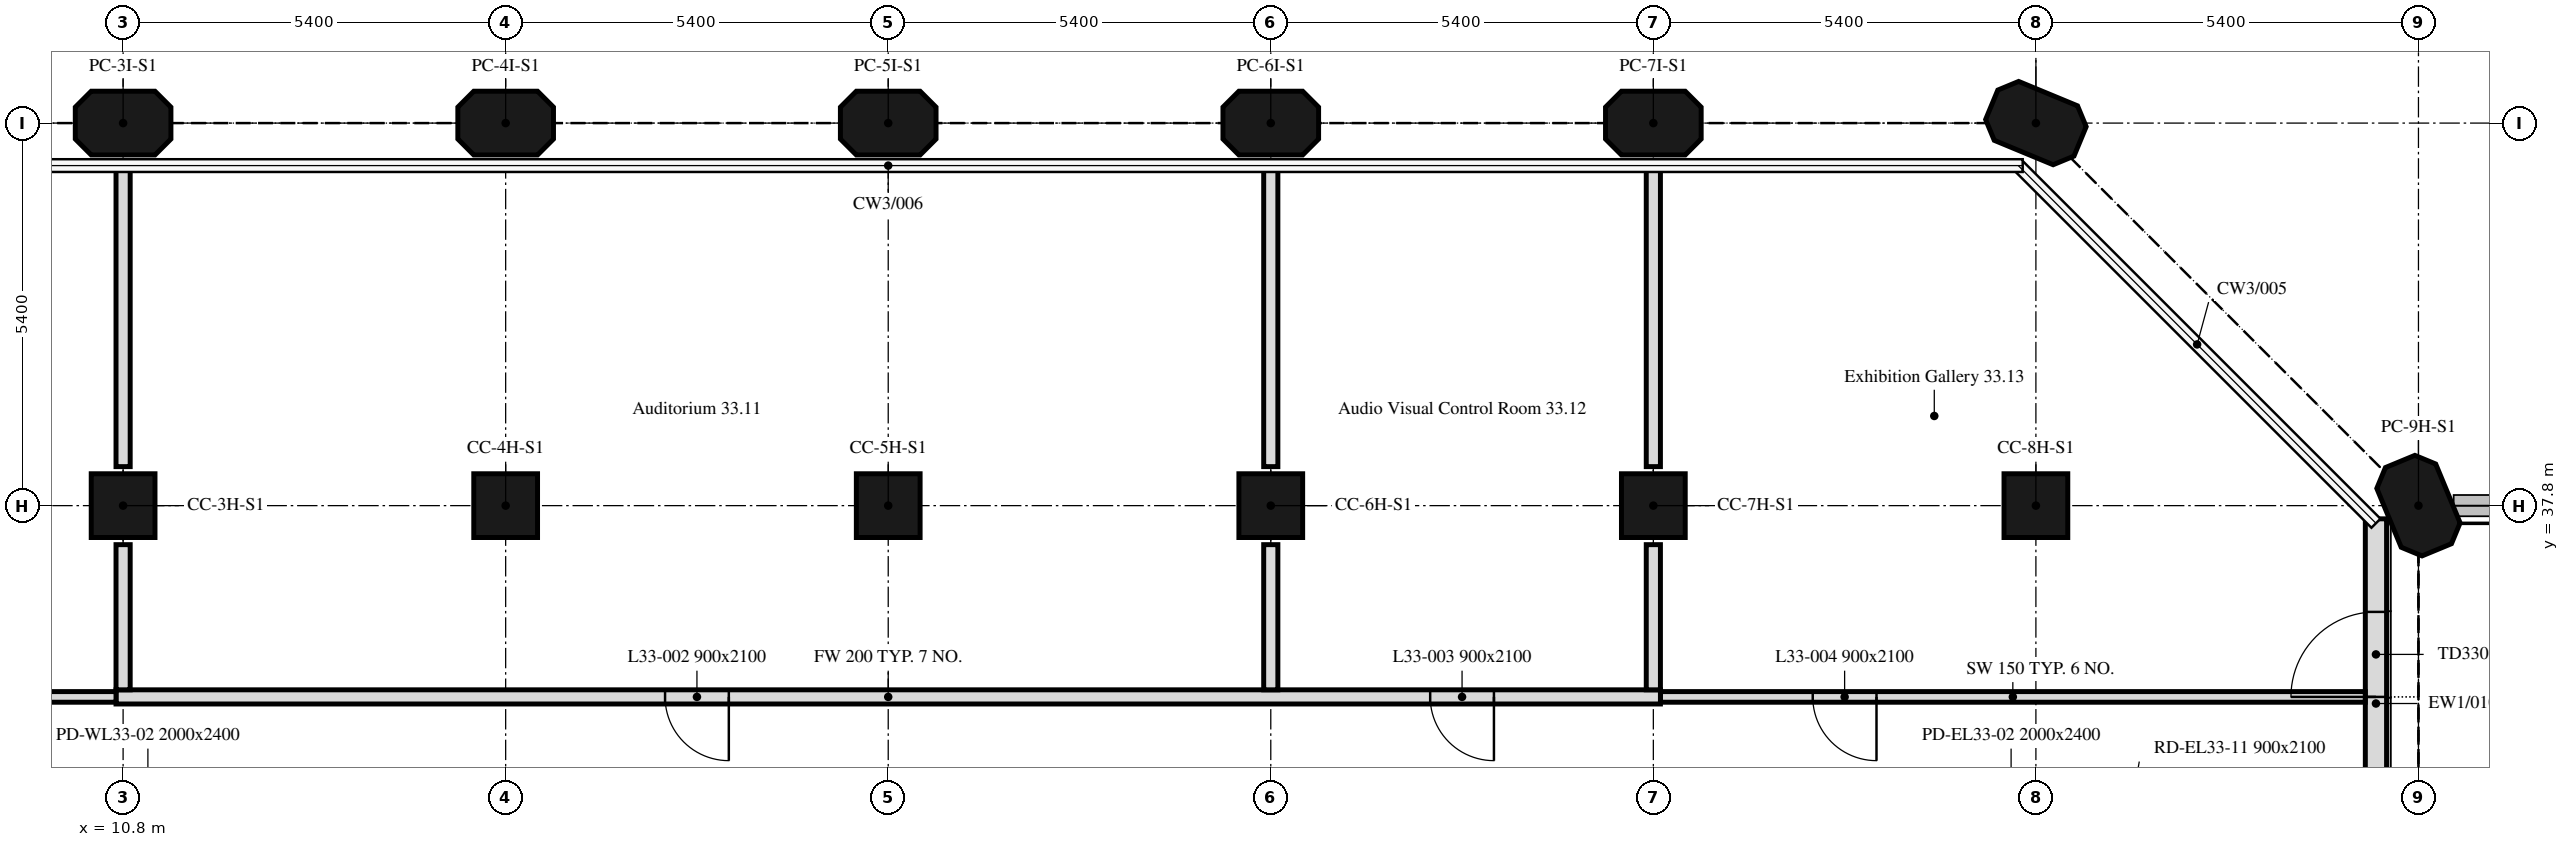
"""IFC4 building model, lengths in metres.
Left out: names, types, materials, properties, quantities, classifications, styles, units other than length and angle.
Written with IfcOpenShell. Run it as: python <this file> out.ifc"""

import sys

from ifc_helpers import new_model, si_unit, direction, frame, frame_2d, origin, origin_2d, place, context, subcontext, project, spatial, polyline, rectangle, outline, extrude, element, fill, save


model = new_model("IFC4")
c1 = context("Model", 3, precision=1e-05, world=origin(), true_north=direction((0.0, 1.0)))
c2 = subcontext(c1, "Body", "Model", "MODEL_VIEW")
j1 = project(units=[si_unit("LENGTHUNIT", "METRE"), si_unit("PLANEANGLEUNIT", "RADIAN")], contexts=[c1])
p1 = place(None, origin())
s1 = spatial("IfcSite", under=j1, at=p1, CompositionType="ELEMENT")
p2 = place(p1, origin())
s2 = spatial("IfcBuilding", under=s1, at=p2, CompositionType="ELEMENT")
p3 = place(p2, frame((0.0, 0.0, 143.2)))
s3 = spatial("IfcBuildingStorey", under=s2, at=p3, CompositionType="ELEMENT", Elevation=143.2)
for number, where, z_axis, x_axis in (
    (1, (10.8, 37.8, 0.0), (0.0, 0.0, 1.0), (1.0, 0.0, 0.0)),
    (2, (16.2, 37.8, 0.0), (0.0, 0.0, 1.0), (1.0, 0.0, 0.0)),
    (3, (21.6, 37.8, 0.0), (0.0, 0.0, 1.0), (1.0, 0.0, 0.0)),
    (4, (27.0, 37.8, 0.0), (0.0, 0.0, 1.0), (1.0, 0.0, 0.0)),
    (5, (32.4, 37.8, 0.0), (0.0, 0.0, 1.0), (1.0, 0.0, 0.0)),
    (6, (37.8, 37.8, 0.0), (0.0, 0.0, 1.0), (1.0, 0.0, 0.0)),
):
    element("IfcColumn", number, at=place(p3, frame(where, z_axis=z_axis, x_axis=x_axis)), inside=s3, PredefinedType="COLUMN", context=c2, shape_type="SweptSolid", body=[
        extrude(rectangle(XDim=0.9, YDim=0.9, at=origin_2d()), origin(), (0.0, 0.0, 1.0), 4.5),
    ])
for number, where, z_axis, x_axis in (
    (7, (43.2, 37.8, 0.0), (0.0, 0.0, 1.0), (-0.383, 0.924, 0.0)),
    (8, (10.8, 43.2, 0.0), (0.0, 0.0, 1.0), (1.0, 0.0, 0.0)),
    (9, (16.2, 43.2, 0.0), (0.0, 0.0, 1.0), (1.0, 0.0, 0.0)),
    (10, (21.6, 43.2, 0.0), (0.0, 0.0, 1.0), (1.0, 0.0, 0.0)),
    (11, (27.0, 43.2, 0.0), (0.0, 0.0, 1.0), (1.0, 0.0, 0.0)),
    (12, (32.4, 43.2, 0.0), (0.0, 0.0, 1.0), (1.0, 0.0, 0.0)),
    (13, (37.8, 43.2, 0.0), (0.0, 0.0, 1.0), (-0.924, 0.383, 0.0)),
):
    element("IfcColumn", number, at=place(p3, frame(where, z_axis=z_axis, x_axis=x_axis)), inside=s3, PredefinedType="COLUMN", context=c2, shape_type="SweptSolid", body=[
        extrude(outline(polyline([(-0.45, -0.45), (0.45, -0.45), (0.675, -0.225), (0.675, 0.225), (0.45, 0.45), (-0.45, 0.45), (-0.675, 0.225), (-0.675, -0.225), (-0.45, -0.45)])), origin(), (0.0, 0.0, 1.0), 4.5),
    ])
p4 = place(p3, frame((42.6, 32.4, 0.0), z_axis=(0.0, 0.0, 1.0), x_axis=(0.0, 1.0, 0.0)))
e14 = element("IfcWall", 14, at=p4, inside=s3, PredefinedType="SOLIDWALL", context=c2, shape_type="SweptSolid", body=[
    extrude(rectangle(XDim=5.214, YDim=0.3, at=frame_2d((2.607, 0.0))), origin(), (0.0, 0.0, 1.0), 4.5),
])
p5 = place(p4, frame((2.7, 0.0, 0.0)))
e15 = element("IfcOpeningElement", 15, at=p5, cuts=e14, PredefinedType="OPENING", context=c2, shape_type="SweptSolid", body=[
    extrude(rectangle(XDim=1.2, YDim=2.4, at=frame_2d((0.6, 1.2))), frame((0.0, 0.16, 0.0), z_axis=(0.0, -1.0, 0.0), x_axis=(1.0, 0.0, 0.0)), (0.0, 0.0, 1.0), 0.32),
])
p6 = place(p3, frame((42.449, 35.1, 0.0), z_axis=(0.0, 0.0, 1.0), x_axis=(-1.0, 0.0, 0.0)))
e16 = element("IfcWall", 16, at=p6, inside=s3, PredefinedType="PARTITIONING", context=c2, shape_type="SweptSolid", body=[
    extrude(rectangle(XDim=9.949, YDim=0.15, at=frame_2d((4.975, 0.0))), origin(), (0.0, 0.0, 1.0), 4.5),
])
p7 = place(p6, frame((6.899, 0.0, 0.0)))
e17 = element("IfcOpeningElement", 17, at=p7, cuts=e16, PredefinedType="OPENING", context=c2, shape_type="SweptSolid", body=[
    extrude(rectangle(XDim=0.9, YDim=2.1, at=frame_2d((0.45, 1.05))), frame((0.0, 0.075, 0.0), z_axis=(0.0, -1.0, 0.0), x_axis=(1.0, 0.0, 0.0)), (0.0, 0.0, 1.0), 0.15),
])
p8 = place(p3, frame((32.5, 35.1, 0.0), z_axis=(0.0, 0.0, 1.0), x_axis=(-1.0, 0.0, 0.0)))
e18 = element("IfcWall", 18, at=p8, inside=s3, PredefinedType="PARTITIONING", context=c2, shape_type="SweptSolid", body=[
    extrude(rectangle(XDim=21.8, YDim=0.2, at=frame_2d((10.9, 0.0))), origin(), (0.0, 0.0, 1.0), 3.75),
])
p9 = place(p8, frame((13.15, 0.0, 0.0)))
e19 = element("IfcOpeningElement", 19, at=p9, cuts=e18, PredefinedType="OPENING", context=c2, shape_type="SweptSolid", body=[
    extrude(rectangle(XDim=0.9, YDim=2.1, at=frame_2d((0.45, 1.05))), frame((0.0, 0.1, 0.0), z_axis=(0.0, -1.0, 0.0), x_axis=(1.0, 0.0, 0.0)), (0.0, 0.0, 1.0), 0.2),
])
p10 = place(p8, frame((2.35, 0.0, 0.0)))
e20 = element("IfcOpeningElement", 20, at=p10, cuts=e18, PredefinedType="OPENING", context=c2, shape_type="SweptSolid", body=[
    extrude(rectangle(XDim=0.9, YDim=2.1, at=frame_2d((0.45, 1.05))), frame((0.0, 0.1, 0.0), z_axis=(0.0, -1.0, 0.0), x_axis=(1.0, 0.0, 0.0)), (0.0, 0.0, 1.0), 0.2),
])
p11 = place(p3, frame((10.7, 35.1, 0.0), z_axis=(0.0, 0.0, 1.0), x_axis=(-1.0, 0.0, 0.0)))
e21 = element("IfcWall", 21, at=p11, inside=s3, PredefinedType="PARTITIONING", context=c2, shape_type="SweptSolid", body=[
    extrude(rectangle(XDim=10.1, YDim=0.15, at=frame_2d((5.05, 0.0))), origin(), (0.0, 0.0, 1.0), 4.5),
])
p12 = place(p11, frame((2.15, 0.0, 0.0)))
e22 = element("IfcOpeningElement", 22, at=p12, cuts=e21, PredefinedType="OPENING", context=c2, shape_type="SweptSolid", body=[
    extrude(rectangle(XDim=0.9, YDim=2.1, at=frame_2d((0.45, 1.05))), frame((0.0, 0.075, 0.0), z_axis=(0.0, -1.0, 0.0), x_axis=(1.0, 0.0, 0.0)), (0.0, 0.0, 1.0), 0.15),
])
p13 = place(p3, frame((10.8, 35.2, 0.0), z_axis=(0.0, 0.0, 1.0), x_axis=(0.0, 1.0, 0.0)))
e23 = element("IfcWall", 23, at=p13, inside=s3, PredefinedType="PARTITIONING", context=c2, shape_type="SweptSolid", body=[
    extrude(rectangle(XDim=2.049, YDim=0.2, at=frame_2d((1.025, 0.0))), origin(), (0.0, 0.0, 1.0), 4.5),
])
p14 = place(p3, frame((10.8, 38.351, 0.0), z_axis=(0.0, 0.0, 1.0), x_axis=(0.0, 1.0, 0.0)))
e24 = element("IfcWall", 24, at=p14, inside=s3, PredefinedType="PARTITIONING", context=c2, shape_type="SweptSolid", body=[
    extrude(rectangle(XDim=4.25, YDim=0.2, at=frame_2d((2.125, 0.0))), origin(), (0.0, 0.0, 1.0), 4.5),
])
p15 = place(p3, frame((27.0, 35.2, 0.0), z_axis=(0.0, 0.0, 1.0), x_axis=(0.0, 1.0, 0.0)))
e25 = element("IfcWall", 25, at=p15, inside=s3, PredefinedType="PARTITIONING", context=c2, shape_type="SweptSolid", body=[
    extrude(rectangle(XDim=2.049, YDim=0.2, at=frame_2d((1.025, 0.0))), origin(), (0.0, 0.0, 1.0), 3.75),
])
p16 = place(p3, frame((27.0, 38.351, 0.0), z_axis=(0.0, 0.0, 1.0), x_axis=(0.0, 1.0, 0.0)))
e26 = element("IfcWall", 26, at=p16, inside=s3, PredefinedType="PARTITIONING", context=c2, shape_type="SweptSolid", body=[
    extrude(rectangle(XDim=4.25, YDim=0.2, at=frame_2d((2.125, 0.0))), origin(), (0.0, 0.0, 1.0), 3.75),
])
p17 = place(p3, frame((32.4, 35.2, 0.0), z_axis=(0.0, 0.0, 1.0), x_axis=(0.0, 1.0, 0.0)))
e27 = element("IfcWall", 27, at=p17, inside=s3, PredefinedType="PARTITIONING", context=c2, shape_type="SweptSolid", body=[
    extrude(rectangle(XDim=2.049, YDim=0.2, at=frame_2d((1.025, 0.0))), origin(), (0.0, 0.0, 1.0), 3.75),
])
p18 = place(p3, frame((32.4, 38.351, 0.0), z_axis=(0.0, 0.0, 1.0), x_axis=(0.0, 1.0, 0.0)))
e28 = element("IfcWall", 28, at=p18, inside=s3, PredefinedType="PARTITIONING", context=c2, shape_type="SweptSolid", body=[
    extrude(rectangle(XDim=4.25, YDim=0.2, at=frame_2d((2.125, 0.0))), origin(), (0.0, 0.0, 1.0), 3.75),
])
p19 = place(p5, origin())
e29 = element("IfcDoor", 29, at=p19, inside=s3, OperationType="SINGLE_SWING_LEFT", PredefinedType="DOOR", context=c2, shape_type="SweptSolid", body=[
    extrude(rectangle(XDim=1.2, YDim=2.4, at=frame_2d((0.6, 1.2))), frame((0.0, 0.025, 0.0), z_axis=(0.0, -1.0, 0.0), x_axis=(1.0, 0.0, 0.0)), (0.0, 0.0, 1.0), 0.05),
])
fill(e15, e29)
p20 = place(p9, origin())
e30 = element("IfcDoor", 30, at=p20, inside=s3, OperationType="SINGLE_SWING_RIGHT", PredefinedType="DOOR", context=c2, shape_type="SweptSolid", body=[
    extrude(rectangle(XDim=0.9, YDim=2.1, at=frame_2d((0.45, 1.05))), frame((0.0, 0.025, 0.0), z_axis=(0.0, -1.0, 0.0), x_axis=(1.0, 0.0, 0.0)), (0.0, 0.0, 1.0), 0.05),
])
fill(e19, e30)
p21 = place(p10, origin())
e31 = element("IfcDoor", 31, at=p21, inside=s3, OperationType="SINGLE_SWING_RIGHT", PredefinedType="DOOR", context=c2, shape_type="SweptSolid", body=[
    extrude(rectangle(XDim=0.9, YDim=2.1, at=frame_2d((0.45, 1.05))), frame((0.0, 0.025, 0.0), z_axis=(0.0, -1.0, 0.0), x_axis=(1.0, 0.0, 0.0)), (0.0, 0.0, 1.0), 0.05),
])
fill(e20, e31)
p22 = place(p7, origin())
e32 = element("IfcDoor", 32, at=p22, inside=s3, OperationType="SINGLE_SWING_LEFT", PredefinedType="DOOR", context=c2, shape_type="SweptSolid", body=[
    extrude(rectangle(XDim=0.9, YDim=2.1, at=frame_2d((0.45, 1.05))), frame((0.0, 0.025, 0.0), z_axis=(0.0, -1.0, 0.0), x_axis=(1.0, 0.0, 0.0)), (0.0, 0.0, 1.0), 0.05),
])
fill(e17, e32)
save(model, sys.argv[1])
